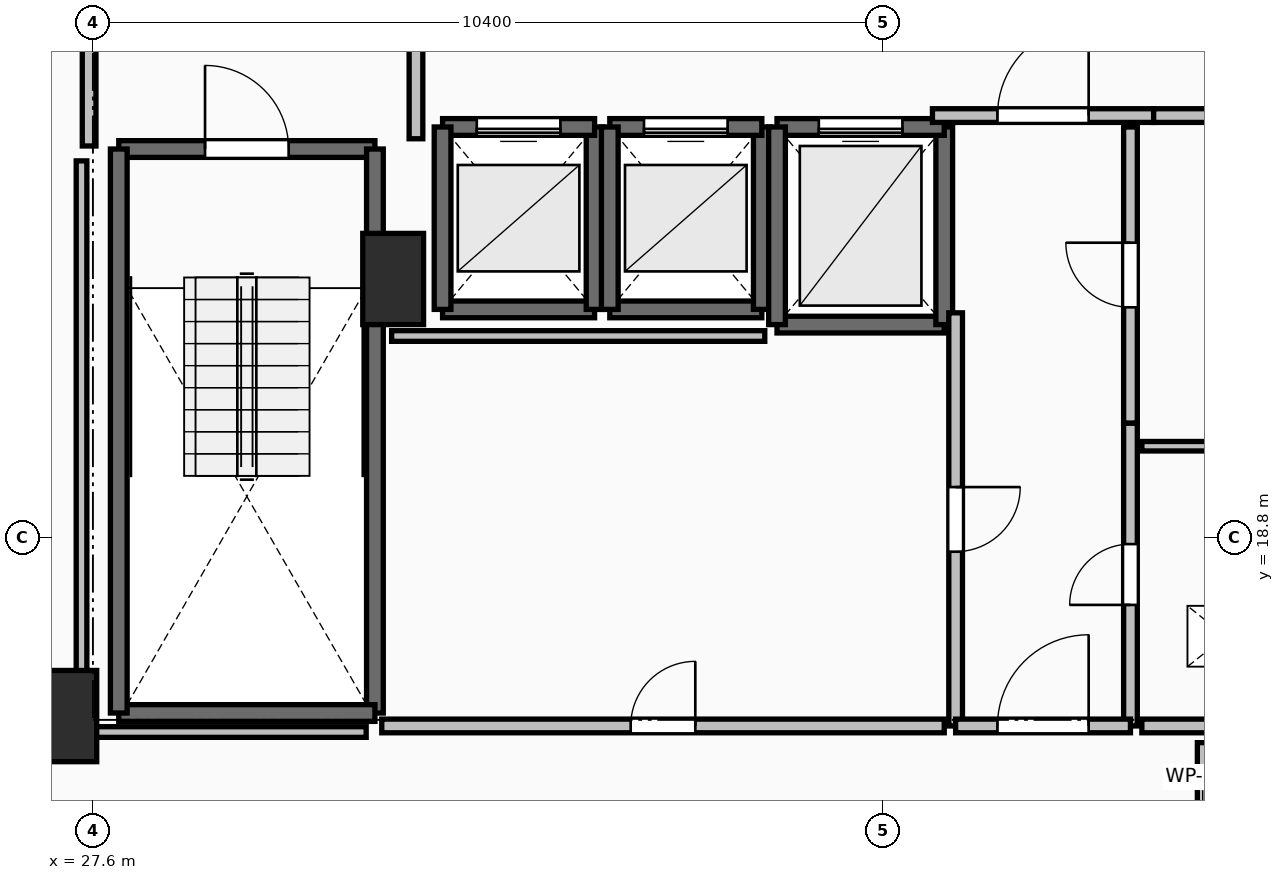
"""IFC4 building model, lengths in metres.
Left out: names, types, materials, properties, quantities, classifications, styles, units other than length and angle.
Written with IfcOpenShell. Run it as: python <this file> out.ifc"""

import sys

from ifc_helpers import new_model, si_unit, direction, frame, frame_2d, origin, origin_2d, place, context, subcontext, project, spatial, rectangle, extrude, element, fill, save


model = new_model("IFC4")
c1 = context("Model", 3, precision=1e-05, world=origin(), true_north=direction((0.0, 1.0)))
c2 = subcontext(c1, "Body", "Model", "MODEL_VIEW")
j1 = project(units=[si_unit("LENGTHUNIT", "METRE"), si_unit("PLANEANGLEUNIT", "RADIAN")], contexts=[c1])
p1 = place(None, origin())
s1 = spatial("IfcSite", under=j1, at=p1, CompositionType="ELEMENT")
p2 = place(p1, origin())
s2 = spatial("IfcBuilding", under=s1, at=p2, CompositionType="ELEMENT")
p3 = place(p2, frame((0.0, 0.0, 153.6)))
s3 = spatial("IfcBuildingStorey", under=s2, at=p3, CompositionType="ELEMENT", Elevation=153.6)
for number, where, z_axis, x_axis in (
    (1, (27.25, 16.45, 0.0), (0.0, 0.0, 1.0), (1.0, 0.0, 0.0)),
    (2, (31.55, 22.2, 0.0), (0.0, 0.0, 1.0), (1.0, 0.0, 0.0)),
):
    element("IfcColumn", number, at=place(p3, frame(where, z_axis=z_axis, x_axis=x_axis)), inside=s3, PredefinedType="PILASTER", context=c2, shape_type="SweptSolid", body=[
        extrude(rectangle(XDim=0.8, YDim=1.2, at=origin_2d()), origin(), (0.0, 0.0, 1.0), 3.5),
    ])
p4 = place(p3, frame((27.94, 23.91, 0.0), z_axis=(0.0, 0.0, 1.0), x_axis=(1.0, 0.0, 0.0)))
e3 = element("IfcWall", 3, at=p4, inside=s3, PredefinedType="SOLIDWALL", context=c2, shape_type="SweptSolid", body=[
    extrude(rectangle(XDim=3.37, YDim=0.22, at=frame_2d((1.685, 0.0))), origin(), (0.0, 0.0, 1.0), 3.24),
])
p5 = place(p4, frame((1.135, 0.0, 0.0)))
e4 = element("IfcOpeningElement", 4, at=p5, cuts=e3, PredefinedType="OPENING", context=c2, shape_type="SweptSolid", body=[
    extrude(rectangle(XDim=1.1, YDim=2.15, at=frame_2d((0.55, 1.075))), frame((0.0, 0.125, 0.0), z_axis=(0.0, -1.0, 0.0), x_axis=(1.0, 0.0, 0.0)), (0.0, 0.0, 1.0), 0.25),
])
p6 = place(p3, frame((31.31, 23.91, 0.0), z_axis=(0.0, 0.0, 1.0), x_axis=(0.0, -1.0, 0.0)))
e5 = element("IfcWall", 5, at=p6, inside=s3, PredefinedType="SOLIDWALL", context=c2, shape_type="SweptSolid", body=[
    extrude(rectangle(XDim=7.42, YDim=0.22, at=frame_2d((3.71, 0.0))), origin(), (0.0, 0.0, 1.0), 3.24),
])
p7 = place(p3, frame((31.31, 16.49, 0.0), z_axis=(0.0, 0.0, 1.0), x_axis=(-1.0, 0.0, 0.0)))
e6 = element("IfcWall", 6, at=p7, inside=s3, PredefinedType="SOLIDWALL", context=c2, shape_type="SweptSolid", body=[
    extrude(rectangle(XDim=3.37, YDim=0.22, at=frame_2d((1.685, 0.0))), origin(), (0.0, 0.0, 1.0), 3.24),
])
p8 = place(p3, frame((27.94, 16.49, 0.0), z_axis=(0.0, 0.0, 1.0), x_axis=(0.0, 1.0, 0.0)))
e7 = element("IfcWall", 7, at=p8, inside=s3, PredefinedType="SOLIDWALL", context=c2, shape_type="SweptSolid", body=[
    extrude(rectangle(XDim=7.42, YDim=0.22, at=frame_2d((3.71, 0.0))), origin(), (0.0, 0.0, 1.0), 3.24),
])
p9 = place(p3, frame((32.2, 21.8, 0.0), z_axis=(0.0, 0.0, 1.0), x_axis=(1.0, 0.0, 0.0)))
e8 = element("IfcWall", 8, at=p9, inside=s3, PredefinedType="SOLIDWALL", context=c2, shape_type="SweptSolid", body=[
    extrude(rectangle(XDim=2.0, YDim=0.22, at=frame_2d((1.0, 0.0))), origin(), (0.0, 0.0, 1.0), 3.24),
])
p10 = place(p3, frame((34.2, 21.8, 0.0), z_axis=(0.0, 0.0, 1.0), x_axis=(0.0, 1.0, 0.0)))
e9 = element("IfcWall", 9, at=p10, inside=s3, PredefinedType="SOLIDWALL", context=c2, shape_type="SweptSolid", body=[
    extrude(rectangle(XDim=2.4, YDim=0.22, at=frame_2d((1.2, 0.0))), origin(), (0.0, 0.0, 1.0), 3.24),
])
p11 = place(p3, frame((34.2, 24.2, 0.0), z_axis=(0.0, 0.0, 1.0), x_axis=(-1.0, 0.0, 0.0)))
e10 = element("IfcWall", 10, at=p11, inside=s3, PredefinedType="SOLIDWALL", context=c2, shape_type="SweptSolid", body=[
    extrude(rectangle(XDim=2.0, YDim=0.22, at=frame_2d((1.0, 0.0))), origin(), (0.0, 0.0, 1.0), 3.24),
])
p12 = place(p11, frame((0.45, 0.0, 0.0)))
e11 = element("IfcOpeningElement", 11, at=p12, cuts=e10, PredefinedType="OPENING", context=c2, shape_type="SweptSolid", body=[
    extrude(rectangle(XDim=1.1, YDim=2.2, at=frame_2d((0.55, 1.1))), frame((0.0, 0.125, 0.0), z_axis=(0.0, -1.0, 0.0), x_axis=(1.0, 0.0, 0.0)), (0.0, 0.0, 1.0), 0.25),
])
p13 = place(p3, frame((32.2, 24.2, 0.0), z_axis=(0.0, 0.0, 1.0), x_axis=(0.0, -1.0, 0.0)))
e12 = element("IfcWall", 12, at=p13, inside=s3, PredefinedType="SOLIDWALL", context=c2, shape_type="SweptSolid", body=[
    extrude(rectangle(XDim=2.4, YDim=0.22, at=frame_2d((1.2, 0.0))), origin(), (0.0, 0.0, 1.0), 3.24),
])
p14 = place(p3, frame((34.4, 21.8, 0.0), z_axis=(0.0, 0.0, 1.0), x_axis=(1.0, 0.0, 0.0)))
e13 = element("IfcWall", 13, at=p14, inside=s3, PredefinedType="SOLIDWALL", context=c2, shape_type="SweptSolid", body=[
    extrude(rectangle(XDim=2.0, YDim=0.22, at=frame_2d((1.0, 0.0))), origin(), (0.0, 0.0, 1.0), 3.24),
])
p15 = place(p3, frame((36.4, 21.8, 0.0), z_axis=(0.0, 0.0, 1.0), x_axis=(0.0, 1.0, 0.0)))
e14 = element("IfcWall", 14, at=p15, inside=s3, PredefinedType="SOLIDWALL", context=c2, shape_type="SweptSolid", body=[
    extrude(rectangle(XDim=2.4, YDim=0.22, at=frame_2d((1.2, 0.0))), origin(), (0.0, 0.0, 1.0), 3.24),
])
p16 = place(p3, frame((36.4, 24.2, 0.0), z_axis=(0.0, 0.0, 1.0), x_axis=(-1.0, 0.0, 0.0)))
e15 = element("IfcWall", 15, at=p16, inside=s3, PredefinedType="SOLIDWALL", context=c2, shape_type="SweptSolid", body=[
    extrude(rectangle(XDim=2.0, YDim=0.22, at=frame_2d((1.0, 0.0))), origin(), (0.0, 0.0, 1.0), 3.24),
])
p17 = place(p16, frame((0.45, 0.0, 0.0)))
e16 = element("IfcOpeningElement", 16, at=p17, cuts=e15, PredefinedType="OPENING", context=c2, shape_type="SweptSolid", body=[
    extrude(rectangle(XDim=1.1, YDim=2.2, at=frame_2d((0.55, 1.1))), frame((0.0, 0.125, 0.0), z_axis=(0.0, -1.0, 0.0), x_axis=(1.0, 0.0, 0.0)), (0.0, 0.0, 1.0), 0.25),
])
p18 = place(p3, frame((34.4, 24.2, 0.0), z_axis=(0.0, 0.0, 1.0), x_axis=(0.0, -1.0, 0.0)))
e17 = element("IfcWall", 17, at=p18, inside=s3, PredefinedType="SOLIDWALL", context=c2, shape_type="SweptSolid", body=[
    extrude(rectangle(XDim=2.4, YDim=0.22, at=frame_2d((1.2, 0.0))), origin(), (0.0, 0.0, 1.0), 3.24),
])
p19 = place(p3, frame((36.6, 21.6, 0.0), z_axis=(0.0, 0.0, 1.0), x_axis=(1.0, 0.0, 0.0)))
e18 = element("IfcWall", 18, at=p19, inside=s3, PredefinedType="SOLIDWALL", context=c2, shape_type="SweptSolid", body=[
    extrude(rectangle(XDim=2.2, YDim=0.22, at=frame_2d((1.1, 0.0))), origin(), (0.0, 0.0, 1.0), 3.24),
])
p20 = place(p3, frame((38.8, 21.6, 0.0), z_axis=(0.0, 0.0, 1.0), x_axis=(0.0, 1.0, 0.0)))
e19 = element("IfcWall", 19, at=p20, inside=s3, PredefinedType="SOLIDWALL", context=c2, shape_type="SweptSolid", body=[
    extrude(rectangle(XDim=2.6, YDim=0.22, at=frame_2d((1.3, 0.0))), origin(), (0.0, 0.0, 1.0), 3.24),
])
p21 = place(p3, frame((38.8, 24.2, 0.0), z_axis=(0.0, 0.0, 1.0), x_axis=(-1.0, 0.0, 0.0)))
e20 = element("IfcWall", 20, at=p21, inside=s3, PredefinedType="SOLIDWALL", context=c2, shape_type="SweptSolid", body=[
    extrude(rectangle(XDim=2.2, YDim=0.22, at=frame_2d((1.1, 0.0))), origin(), (0.0, 0.0, 1.0), 3.24),
])
p22 = place(p21, frame((0.55, 0.0, 0.0)))
e21 = element("IfcOpeningElement", 21, at=p22, cuts=e20, PredefinedType="OPENING", context=c2, shape_type="SweptSolid", body=[
    extrude(rectangle(XDim=1.1, YDim=2.2, at=frame_2d((0.55, 1.1))), frame((0.0, 0.125, 0.0), z_axis=(0.0, -1.0, 0.0), x_axis=(1.0, 0.0, 0.0)), (0.0, 0.0, 1.0), 0.25),
])
p23 = place(p3, frame((36.6, 24.2, 0.0), z_axis=(0.0, 0.0, 1.0), x_axis=(0.0, -1.0, 0.0)))
e22 = element("IfcWall", 22, at=p23, inside=s3, PredefinedType="SOLIDWALL", context=c2, shape_type="SweptSolid", body=[
    extrude(rectangle(XDim=2.6, YDim=0.22, at=frame_2d((1.3, 0.0))), origin(), (0.0, 0.0, 1.0), 3.24),
])
p24 = place(p3, frame((31.85, 24.045, 0.0), z_axis=(0.0, 0.0, 1.0), x_axis=(0.0, 1.0, 0.0)))
e23 = element("IfcWall", 23, at=p24, inside=s3, PredefinedType="PARTITIONING", context=c2, shape_type="SweptSolid", body=[
    extrude(rectangle(XDim=3.91, YDim=0.18, at=frame_2d((1.955, 0.0))), origin(), (0.0, 0.0, 1.0), 3.24),
])
p25 = place(p24, frame((1.355, 0.0, 0.0)))
e24 = element("IfcOpeningElement", 24, at=p25, cuts=e23, PredefinedType="OPENING", context=c2, shape_type="SweptSolid", body=[
    extrude(rectangle(XDim=1.2, YDim=2.15, at=frame_2d((0.6, 1.075))), frame((0.0, 0.105, 0.0), z_axis=(0.0, -1.0, 0.0), x_axis=(1.0, 0.0, 0.0)), (0.0, 0.0, 1.0), 0.21),
])
p26 = place(p3, frame((27.55, 28.0, 0.0), z_axis=(0.0, 0.0, 1.0), x_axis=(0.0, -1.0, 0.0)))
e25 = element("IfcWall", 25, at=p26, inside=s3, PredefinedType="PARTITIONING", context=c2, shape_type="SweptSolid", body=[
    extrude(rectangle(XDim=4.05, YDim=0.18, at=frame_2d((2.025, 0.0))), origin(), (0.0, 0.0, 1.0), 3.24),
])
p27 = place(p26, frame((1.425, 0.0, 0.0)))
e26 = element("IfcOpeningElement", 26, at=p27, cuts=e25, PredefinedType="OPENING", context=c2, shape_type="SweptSolid", body=[
    extrude(rectangle(XDim=1.2, YDim=2.15, at=frame_2d((0.6, 1.075))), frame((0.0, 0.105, 0.0), z_axis=(0.0, -1.0, 0.0), x_axis=(1.0, 0.0, 0.0)), (0.0, 0.0, 1.0), 0.21),
])
p28 = place(p3, frame((38.645, 24.35, 0.0), z_axis=(0.0, 0.0, 1.0), x_axis=(1.0, 0.0, 0.0)))
e27 = element("IfcWall", 27, at=p28, inside=s3, PredefinedType="PARTITIONING", context=c2, shape_type="SweptSolid", body=[
    extrude(rectangle(XDim=2.91, YDim=0.18, at=frame_2d((1.455, 0.0))), origin(), (0.0, 0.0, 1.0), 3.24),
])
p29 = place(p28, frame((0.855, 0.0, 0.0)))
e28 = element("IfcOpeningElement", 28, at=p29, cuts=e27, PredefinedType="OPENING", context=c2, shape_type="SweptSolid", body=[
    extrude(rectangle(XDim=1.2, YDim=2.15, at=frame_2d((0.6, 1.075))), frame((0.0, 0.105, 0.0), z_axis=(0.0, -1.0, 0.0), x_axis=(1.0, 0.0, 0.0)), (0.0, 0.0, 1.0), 0.21),
])
p30 = place(p3, frame((41.555, 24.35, 0.0), z_axis=(0.0, 0.0, 1.0), x_axis=(1.0, 0.0, 0.0)))
e29 = element("IfcWall", 29, at=p30, inside=s3, PredefinedType="PARTITIONING", context=c2, shape_type="SweptSolid", body=[
    extrude(rectangle(XDim=2.445, YDim=0.18, at=frame_2d((1.223, 0.0))), origin(), (0.0, 0.0, 1.0), 3.24),
])
p31 = place(p30, frame((0.798, 0.0, 0.0)))
e30 = element("IfcOpeningElement", 30, at=p31, cuts=e29, PredefinedType="OPENING", context=c2, shape_type="SweptSolid", body=[
    extrude(rectangle(XDim=0.85, YDim=2.1, at=frame_2d((0.425, 1.05))), frame((0.0, 0.105, 0.0), z_axis=(0.0, -1.0, 0.0), x_axis=(1.0, 0.0, 0.0)), (0.0, 0.0, 1.0), 0.21),
])
p32 = place(p3, frame((41.25, 16.32, 0.0), z_axis=(0.0, 0.0, 1.0), x_axis=(0.0, 1.0, 0.0)))
e31 = element("IfcWall", 31, at=p32, inside=s3, PredefinedType="PARTITIONING", context=c2, shape_type="SweptSolid", body=[
    extrude(rectangle(XDim=3.985, YDim=0.18, at=frame_2d((1.992, 0.0))), origin(), (0.0, 0.0, 1.0), 3.24),
])
p33 = place(p32, frame((1.593, 0.0, 0.0)))
e32 = element("IfcOpeningElement", 32, at=p33, cuts=e31, PredefinedType="OPENING", context=c2, shape_type="SweptSolid", body=[
    extrude(rectangle(XDim=0.8, YDim=2.05, at=frame_2d((0.4, 1.025))), frame((0.0, 0.105, 0.0), z_axis=(0.0, -1.0, 0.0), x_axis=(1.0, 0.0, 0.0)), (0.0, 0.0, 1.0), 0.21),
])
p34 = place(p3, frame((41.25, 20.305, 0.0), z_axis=(0.0, 0.0, 1.0), x_axis=(0.0, 1.0, 0.0)))
e33 = element("IfcWall", 33, at=p34, inside=s3, PredefinedType="PARTITIONING", context=c2, shape_type="SweptSolid", body=[
    extrude(rectangle(XDim=3.895, YDim=0.18, at=frame_2d((1.948, 0.0))), origin(), (0.0, 0.0, 1.0), 3.24),
])
p35 = place(p34, frame((1.522, 0.0, 0.0)))
e34 = element("IfcOpeningElement", 34, at=p35, cuts=e33, PredefinedType="OPENING", context=c2, shape_type="SweptSolid", body=[
    extrude(rectangle(XDim=0.85, YDim=2.1, at=frame_2d((0.425, 1.05))), frame((0.0, 0.105, 0.0), z_axis=(0.0, -1.0, 0.0), x_axis=(1.0, 0.0, 0.0)), (0.0, 0.0, 1.0), 0.21),
])
p36 = place(p3, frame((38.95, 21.755, 0.0), z_axis=(0.0, 0.0, 1.0), x_axis=(0.0, -1.0, 0.0)))
e35 = element("IfcWall", 35, at=p36, inside=s3, PredefinedType="PARTITIONING", context=c2, shape_type="SweptSolid", body=[
    extrude(rectangle(XDim=5.435, YDim=0.18, at=frame_2d((2.717, 0.0))), origin(), (0.0, 0.0, 1.0), 3.24),
])
p37 = place(p36, frame((2.292, 0.0, 0.0)))
e36 = element("IfcOpeningElement", 36, at=p37, cuts=e35, PredefinedType="OPENING", context=c2, shape_type="SweptSolid", body=[
    extrude(rectangle(XDim=0.85, YDim=2.1, at=frame_2d((0.425, 1.05))), frame((0.0, 0.105, 0.0), z_axis=(0.0, -1.0, 0.0), x_axis=(1.0, 0.0, 0.0)), (0.0, 0.0, 1.0), 0.21),
])
p38 = place(p3, frame((38.95, 16.32, 0.0), z_axis=(0.0, 0.0, 1.0), x_axis=(1.0, 0.0, 0.0)))
e37 = element("IfcWall", 37, at=p38, inside=s3, PredefinedType="PARTITIONING", context=c2, shape_type="SweptSolid", body=[
    extrude(rectangle(XDim=2.3, YDim=0.18, at=frame_2d((1.15, 0.0))), origin(), (0.0, 0.0, 1.0), 3.24),
])
p39 = place(p38, frame((0.55, 0.0, 0.0)))
e38 = element("IfcOpeningElement", 38, at=p39, cuts=e37, PredefinedType="OPENING", context=c2, shape_type="SweptSolid", body=[
    extrude(rectangle(XDim=1.2, YDim=2.15, at=frame_2d((0.6, 1.075))), frame((0.0, 0.105, 0.0), z_axis=(0.0, -1.0, 0.0), x_axis=(1.0, 0.0, 0.0)), (0.0, 0.0, 1.0), 0.21),
])
p40 = place(p3, frame((44.6, 20.0, 0.0), z_axis=(0.0, 0.0, 1.0), x_axis=(-1.0, 0.0, 0.0)))
e39 = element("IfcWall", 39, at=p40, inside=s3, PredefinedType="PARTITIONING", context=c2, shape_type="SweptSolid", body=[
    extrude(rectangle(XDim=3.2, YDim=0.125, at=frame_2d((1.6, 0.0))), origin(), (0.0, 0.0, 1.0), 3.24),
])
p41 = place(p3, frame((41.4, 16.32, 0.0), z_axis=(0.0, 0.0, 1.0), x_axis=(1.0, 0.0, 0.0)))
e40 = element("IfcWall", 40, at=p41, inside=s3, PredefinedType="PARTITIONING", context=c2, shape_type="SweptSolid", body=[
    extrude(rectangle(XDim=3.2, YDim=0.18, at=frame_2d((1.6, 0.0))), origin(), (0.0, 0.0, 1.0), 3.24),
])
p42 = place(p41, frame((1.2, 0.0, 0.0)))
e41 = element("IfcOpeningElement", 41, at=p42, cuts=e40, PredefinedType="OPENING", context=c2, shape_type="SweptSolid", body=[
    extrude(rectangle(XDim=0.8, YDim=2.05, at=frame_2d((0.4, 1.025))), frame((0.0, 0.105, 0.0), z_axis=(0.0, -1.0, 0.0), x_axis=(1.0, 0.0, 0.0)), (0.0, 0.0, 1.0), 0.21),
])
p43 = place(p3, frame((31.4, 16.32, 0.0), z_axis=(0.0, 0.0, 1.0), x_axis=(1.0, 0.0, 0.0)))
e42 = element("IfcWall", 42, at=p43, inside=s3, PredefinedType="PARTITIONING", context=c2, shape_type="SweptSolid", body=[
    extrude(rectangle(XDim=7.4, YDim=0.18, at=frame_2d((3.7, 0.0))), origin(), (0.0, 0.0, 1.0), 3.24),
])
p44 = place(p43, frame((3.275, 0.0, 0.0)))
e43 = element("IfcOpeningElement", 43, at=p44, cuts=e42, PredefinedType="OPENING", context=c2, shape_type="SweptSolid", body=[
    extrude(rectangle(XDim=0.85, YDim=2.1, at=frame_2d((0.425, 1.05))), frame((0.0, 0.105, 0.0), z_axis=(0.0, -1.0, 0.0), x_axis=(1.0, 0.0, 0.0)), (0.0, 0.0, 1.0), 0.21),
])
p45 = place(p3, frame((36.439, 21.45, 0.0), z_axis=(0.0, 0.0, 1.0), x_axis=(-1.0, 0.0, 0.0)))
e44 = element("IfcWall", 44, at=p45, inside=s3, PredefinedType="PARTITIONING", context=c2, shape_type="SweptSolid", body=[
    extrude(rectangle(XDim=4.909, YDim=0.14, at=frame_2d((2.455, 0.0))), origin(), (0.0, 0.0, 1.0), 3.24),
])
p46 = place(p3, frame((27.45, 23.754, 0.0), z_axis=(0.0, 0.0, 1.0), x_axis=(0.0, -1.0, 0.0)))
e45 = element("IfcWall", 45, at=p46, inside=s3, PredefinedType="PARTITIONING", context=c2, shape_type="SweptSolid", body=[
    extrude(rectangle(XDim=7.514, YDim=0.14, at=frame_2d((3.757, 0.0))), origin(), (0.0, 0.0, 1.0), 2.432),
])
p47 = place(p3, frame((27.45, 16.24, 0.0), z_axis=(0.0, 0.0, 1.0), x_axis=(1.0, 0.0, 0.0)))
e46 = element("IfcWall", 46, at=p47, inside=s3, PredefinedType="PARTITIONING", context=c2, shape_type="SweptSolid", body=[
    extrude(rectangle(XDim=3.745, YDim=0.14, at=frame_2d((1.873, 0.0))), origin(), (0.0, 0.0, 1.0), 2.432),
])
p48 = place(p3, frame((42.2, 16.1, 0.0), z_axis=(0.0, 0.0, 1.0), x_axis=(0.0, -1.0, 0.0)))
e47 = element("IfcWall", 47, at=p48, inside=s3, PredefinedType="PARTITIONING", context=c2, shape_type="SweptSolid", body=[
    extrude(rectangle(XDim=1.83, YDim=0.14, at=frame_2d((0.915, 0.0))), origin(), (0.0, 0.0, 1.0), 2.886),
])
p49 = place(p5, origin())
e48 = element("IfcDoor", 48, at=p49, inside=s3, OperationType="SINGLE_SWING_LEFT", PredefinedType="DOOR", context=c2, shape_type="SweptSolid", body=[
    extrude(rectangle(XDim=1.1, YDim=2.15, at=frame_2d((0.55, 1.075))), frame((0.0, 0.025, 0.0), z_axis=(0.0, -1.0, 0.0), x_axis=(1.0, 0.0, 0.0)), (0.0, 0.0, 1.0), 0.05),
])
fill(e4, e48)
p50 = place(p12, origin())
e49 = element("IfcDoor", 49, at=p50, inside=s3, OperationType="SLIDING_TO_LEFT", PredefinedType="DOOR", context=c2, shape_type="SweptSolid", body=[
    extrude(rectangle(XDim=1.1, YDim=2.2, at=frame_2d((0.55, 1.1))), frame((0.0, 0.025, 0.0), z_axis=(0.0, -1.0, 0.0), x_axis=(1.0, 0.0, 0.0)), (0.0, 0.0, 1.0), 0.05),
])
fill(e11, e49)
p51 = place(p17, origin())
e50 = element("IfcDoor", 50, at=p51, inside=s3, OperationType="SLIDING_TO_LEFT", PredefinedType="DOOR", context=c2, shape_type="SweptSolid", body=[
    extrude(rectangle(XDim=1.1, YDim=2.2, at=frame_2d((0.55, 1.1))), frame((0.0, 0.025, 0.0), z_axis=(0.0, -1.0, 0.0), x_axis=(1.0, 0.0, 0.0)), (0.0, 0.0, 1.0), 0.05),
])
fill(e16, e50)
p52 = place(p22, origin())
e51 = element("IfcDoor", 51, at=p52, inside=s3, OperationType="SLIDING_TO_LEFT", PredefinedType="DOOR", context=c2, shape_type="SweptSolid", body=[
    extrude(rectangle(XDim=1.1, YDim=2.2, at=frame_2d((0.55, 1.1))), frame((0.0, 0.025, 0.0), z_axis=(0.0, -1.0, 0.0), x_axis=(1.0, 0.0, 0.0)), (0.0, 0.0, 1.0), 0.05),
])
fill(e21, e51)
p53 = place(p29, origin())
e52 = element("IfcDoor", 52, at=p53, inside=s3, OperationType="SINGLE_SWING_RIGHT", PredefinedType="DOOR", context=c2, shape_type="SweptSolid", body=[
    extrude(rectangle(XDim=1.2, YDim=2.15, at=frame_2d((0.6, 1.075))), frame((0.0, 0.025, 0.0), z_axis=(0.0, -1.0, 0.0), x_axis=(1.0, 0.0, 0.0)), (0.0, 0.0, 1.0), 0.05),
])
fill(e28, e52)
p54 = place(p33, origin())
e53 = element("IfcDoor", 53, at=p54, inside=s3, OperationType="SINGLE_SWING_LEFT", PredefinedType="DOOR", context=c2, shape_type="SweptSolid", body=[
    extrude(rectangle(XDim=0.8, YDim=2.05, at=frame_2d((0.4, 1.025))), frame((0.0, 0.025, 0.0), z_axis=(0.0, -1.0, 0.0), x_axis=(1.0, 0.0, 0.0)), (0.0, 0.0, 1.0), 0.05),
])
fill(e32, e53)
p55 = place(p35, origin())
e54 = element("IfcDoor", 54, at=p55, inside=s3, OperationType="SINGLE_SWING_RIGHT", PredefinedType="DOOR", context=c2, shape_type="SweptSolid", body=[
    extrude(rectangle(XDim=0.85, YDim=2.1, at=frame_2d((0.425, 1.05))), frame((0.0, 0.025, 0.0), z_axis=(0.0, -1.0, 0.0), x_axis=(1.0, 0.0, 0.0)), (0.0, 0.0, 1.0), 0.05),
])
fill(e34, e54)
p56 = place(p37, origin())
e55 = element("IfcDoor", 55, at=p56, inside=s3, OperationType="SINGLE_SWING_LEFT", PredefinedType="DOOR", context=c2, shape_type="SweptSolid", body=[
    extrude(rectangle(XDim=0.85, YDim=2.1, at=frame_2d((0.425, 1.05))), frame((0.0, 0.025, 0.0), z_axis=(0.0, -1.0, 0.0), x_axis=(1.0, 0.0, 0.0)), (0.0, 0.0, 1.0), 0.05),
])
fill(e36, e55)
p57 = place(p39, origin())
e56 = element("IfcDoor", 56, at=p57, inside=s3, OperationType="SINGLE_SWING_RIGHT", PredefinedType="DOOR", context=c2, shape_type="SweptSolid", body=[
    extrude(rectangle(XDim=1.2, YDim=2.15, at=frame_2d((0.6, 1.075))), frame((0.0, 0.025, 0.0), z_axis=(0.0, -1.0, 0.0), x_axis=(1.0, 0.0, 0.0)), (0.0, 0.0, 1.0), 0.05),
])
fill(e38, e56)
p58 = place(p44, origin())
e57 = element("IfcDoor", 57, at=p58, inside=s3, OperationType="SINGLE_SWING_RIGHT", PredefinedType="DOOR", context=c2, shape_type="SweptSolid", body=[
    extrude(rectangle(XDim=0.85, YDim=2.1, at=frame_2d((0.425, 1.05))), frame((0.0, 0.025, 0.0), z_axis=(0.0, -1.0, 0.0), x_axis=(1.0, 0.0, 0.0)), (0.0, 0.0, 1.0), 0.05),
])
fill(e43, e57)
save(model, sys.argv[1])
